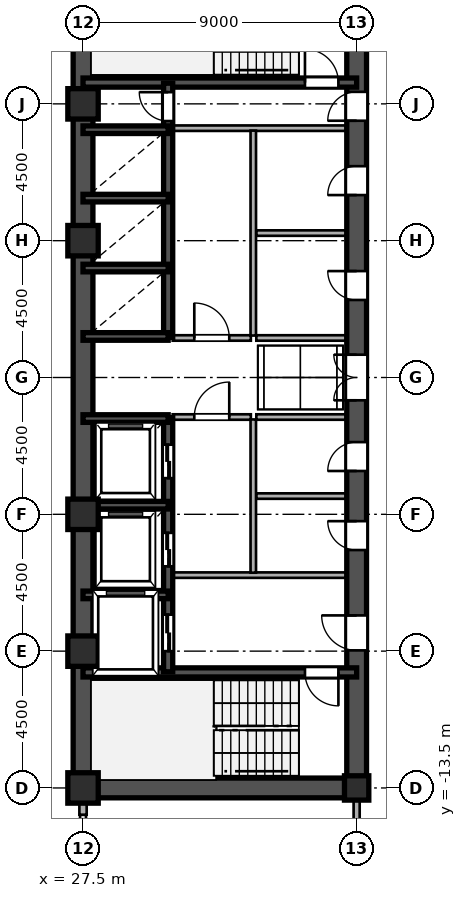
"""IFC4 building model, lengths in metres.
Left out: names, types, materials, properties, quantities, classifications, styles, units other than length and angle.
Written with IfcOpenShell. Run it as: python <this file> out.ifc"""

import sys

from ifc_helpers import new_model, si_unit, direction, frame, frame_2d, origin, origin_2d, place, context, subcontext, project, spatial, rectangle, hollow_rectangle, i_section, extrude, source, transform, mapped, element, fill, save


model = new_model("IFC4")
c1 = context("Model", 3, precision=1e-05, world=origin(), true_north=direction((0.0, 1.0)))
c2 = subcontext(c1, "Body", "Model", "MODEL_VIEW")
j1 = project(units=[si_unit("LENGTHUNIT", "METRE"), si_unit("PLANEANGLEUNIT", "RADIAN")], contexts=[c1])
p1 = place(None, origin())
s1 = spatial("IfcSite", under=j1, at=p1, CompositionType="ELEMENT")
p2 = place(p1, origin())
s2 = spatial("IfcBuilding", under=s1, at=p2, CompositionType="ELEMENT")
p3 = place(p2, frame((0.0, 0.0, 69.3)))
s3 = spatial("IfcBuildingStorey", under=s2, at=p3, CompositionType="ELEMENT", Elevation=69.3)
m1 = source(origin(), c2, "Body", "SweptSolid", [
    extrude(hollow_rectangle(XDim=1.0, YDim=1.0, WallThickness=0.042, at=origin_2d()), origin(), (0.0, 0.0, 1.0), 3.6),
])
for number, where, z_axis, x_axis in (
    (1, (27.5, -13.5, 0.0), (0.0, 0.0, 1.0), (1.0, 0.0, 0.0)),
    (2, (27.5, -9.0, 0.0), (0.0, 0.0, 1.0), (1.0, 0.0, 0.0)),
    (3, (27.5, -4.5, 0.0), (0.0, 0.0, 1.0), (1.0, 0.0, 0.0)),
    (4, (27.5, 4.5, 0.0), (0.0, 0.0, 1.0), (1.0, 0.0, 0.0)),
    (5, (27.5, 9.0, 0.0), (0.0, 0.0, 1.0), (1.0, 0.0, 0.0)),
):
    element("IfcColumn", number, at=place(p3, frame(where, z_axis=z_axis, x_axis=x_axis)), inside=s3, PredefinedType="COLUMN", context=c2, shape_type="MappedRepresentation", body=[
        mapped(m1, transform((0.0, 0.0, 0.0), scale=1.0)),
    ])
m2 = source(origin(), c2, "Body", "SweptSolid", [
    extrude(i_section(OverallWidth=0.8, OverallDepth=0.8, WebThickness=0.032, FlangeThickness=0.05, at=origin_2d()), origin(), (0.0, 0.0, 1.0), 3.6),
])
p4 = place(p3, frame((36.5, -13.5, 0.0), z_axis=(0.0, 0.0, 1.0), x_axis=(1.0, 0.0, 0.0)))
e6 = element("IfcColumn", 6, at=p4, inside=s3, PredefinedType="COLUMN", context=c2, shape_type="MappedRepresentation", body=[
    mapped(m2, transform((0.0, 0.0, 0.0), scale=1.0)),
])
p5 = place(p3, frame((27.5, -14.38, 0.0), z_axis=(0.0, 0.0, 1.0), x_axis=(0.0, 1.0, 0.0)))
e7 = element("IfcWall", 7, at=p5, inside=s3, PredefinedType="SOLIDWALL", context=c2, shape_type="SweptSolid", body=[
    extrude(rectangle(XDim=0.55, YDim=0.24, at=frame_2d((0.275, 0.0))), origin(), (0.0, 0.0, 1.0), 2.88),
])
for number, where, z_axis, x_axis in (
    (8, (27.5, -13.5, 0.0), (0.0, 0.0, 1.0), (0.0, 1.0, 0.0)),
    (9, (27.5, 1.3, 0.0), (0.0, 0.0, 1.0), (0.0, 1.0, 0.0)),
):
    element("IfcWall", number, at=place(p3, frame(where, z_axis=z_axis, x_axis=x_axis)), inside=s3, PredefinedType="SHEAR", context=c2, shape_type="SweptSolid", body=[
        extrude(rectangle(XDim=12.2, YDim=0.65, at=frame_2d((6.1, 0.0))), origin(), (0.0, 0.0, 1.0), 3.38),
    ])
p6 = place(p3, frame((27.5, -1.3, 0.0), z_axis=(0.0, 0.0, 1.0), x_axis=(0.0, 1.0, 0.0)))
e10 = element("IfcWall", 10, at=p6, inside=s3, PredefinedType="SHEAR", context=c2, shape_type="SweptSolid", body=[
    extrude(rectangle(XDim=2.6, YDim=0.65, at=frame_2d((1.3, 0.0))), origin(), (0.0, 0.0, 1.0), 3.38),
])
p7 = place(p3, frame((27.5, -13.5, 0.0), z_axis=(0.0, 0.0, 1.0), x_axis=(1.0, 0.0, 0.0)))
e11 = element("IfcWall", 11, at=p7, inside=s3, PredefinedType="SHEAR", context=c2, shape_type="SweptSolid", body=[
    extrude(rectangle(XDim=9.0, YDim=0.65, at=frame_2d((4.5, 0.0))), origin(), (0.0, 0.0, 1.0), 3.38),
])
p8 = place(p3, frame((36.5, -13.65, 0.0), z_axis=(0.0, 0.0, 1.0), x_axis=(0.0, 1.0, 0.0)))
e12 = element("IfcWall", 12, at=p8, inside=s3, PredefinedType="SHEAR", context=c2, shape_type="SweptSolid", body=[
    extrude(rectangle(XDim=7.15, YDim=0.65, at=frame_2d((3.575, 0.0))), origin(), (0.0, 0.0, 1.0), 3.38),
])
p9 = place(p8, frame((4.675, 0.0, 0.0)))
e13 = element("IfcOpeningElement", 13, at=p9, cuts=e12, PredefinedType="OPENING", context=c2, shape_type="SweptSolid", body=[
    extrude(rectangle(XDim=1.15, YDim=2.2, at=frame_2d((0.575, 1.1))), frame((0.0, 0.335, 0.0), z_axis=(0.0, -1.0, 0.0), x_axis=(1.0, 0.0, 0.0)), (0.0, 0.0, 1.0), 0.67),
])
p10 = place(p3, frame((36.5, -1.3, 0.0), z_axis=(0.0, 0.0, 1.0), x_axis=(0.0, 1.0, 0.0)))
e14 = element("IfcWall", 14, at=p10, inside=s3, PredefinedType="SHEAR", context=c2, shape_type="SweptSolid", body=[
    extrude(rectangle(XDim=2.6, YDim=0.65, at=frame_2d((1.3, 0.0))), origin(), (0.0, 0.0, 1.0), 3.38),
])
p11 = place(p10, frame((0.55, 0.0, 0.0)))
e15 = element("IfcOpeningElement", 15, at=p11, cuts=e14, PredefinedType="OPENING", context=c2, shape_type="SweptSolid", body=[
    extrude(rectangle(XDim=1.5, YDim=2.3, at=frame_2d((0.75, 1.15))), frame((0.0, 0.335, 0.0), z_axis=(0.0, -1.0, 0.0), x_axis=(1.0, 0.0, 0.0)), (0.0, 0.0, 1.0), 0.67),
])
p12 = place(p3, frame((36.5, 8.2, 0.0), z_axis=(0.0, 0.0, 1.0), x_axis=(0.0, 1.0, 0.0)))
e16 = element("IfcWall", 16, at=p12, inside=s3, PredefinedType="SHEAR", context=c2, shape_type="SweptSolid", body=[
    extrude(rectangle(XDim=5.45, YDim=0.65, at=frame_2d((2.725, 0.0))), origin(), (0.0, 0.0, 1.0), 3.38),
])
p13 = place(p12, frame((0.245, 0.0, 0.0)))
e17 = element("IfcOpeningElement", 17, at=p13, cuts=e16, PredefinedType="OPENING", context=c2, shape_type="SweptSolid", body=[
    extrude(rectangle(XDim=0.95, YDim=2.15, at=frame_2d((0.475, 1.075))), frame((0.0, 0.335, 0.0), z_axis=(0.0, -1.0, 0.0), x_axis=(1.0, 0.0, 0.0)), (0.0, 0.0, 1.0), 0.67),
])
p14 = place(p3, frame((36.5, -6.5, 0.0), z_axis=(0.0, 0.0, 1.0), x_axis=(0.0, 1.0, 0.0)))
e18 = element("IfcWall", 18, at=p14, inside=s3, PredefinedType="SHEAR", context=c2, shape_type="SweptSolid", body=[
    extrude(rectangle(XDim=2.6, YDim=0.65, at=frame_2d((1.3, 0.0))), origin(), (0.0, 0.0, 1.0), 3.38),
])
p15 = place(p14, frame((0.825, 0.0, 0.0)))
e19 = element("IfcOpeningElement", 19, at=p15, cuts=e18, PredefinedType="OPENING", context=c2, shape_type="SweptSolid", body=[
    extrude(rectangle(XDim=0.95, YDim=2.15, at=frame_2d((0.475, 1.075))), frame((0.0, 0.335, 0.0), z_axis=(0.0, -1.0, 0.0), x_axis=(1.0, 0.0, 0.0)), (0.0, 0.0, 1.0), 0.67),
])
p16 = place(p3, frame((36.5, -3.9, 0.0), z_axis=(0.0, 0.0, 1.0), x_axis=(0.0, 1.0, 0.0)))
e20 = element("IfcWall", 20, at=p16, inside=s3, PredefinedType="SHEAR", context=c2, shape_type="SweptSolid", body=[
    extrude(rectangle(XDim=2.6, YDim=0.65, at=frame_2d((1.3, 0.0))), origin(), (0.0, 0.0, 1.0), 3.38),
])
p17 = place(p16, frame((0.825, 0.0, 0.0)))
e21 = element("IfcOpeningElement", 21, at=p17, cuts=e20, PredefinedType="OPENING", context=c2, shape_type="SweptSolid", body=[
    extrude(rectangle(XDim=0.95, YDim=2.15, at=frame_2d((0.475, 1.075))), frame((0.0, 0.335, 0.0), z_axis=(0.0, -1.0, 0.0), x_axis=(1.0, 0.0, 0.0)), (0.0, 0.0, 1.0), 0.67),
])
p18 = place(p3, frame((36.5, 1.3, 0.0), z_axis=(0.0, 0.0, 1.0), x_axis=(0.0, 1.0, 0.0)))
e22 = element("IfcWall", 22, at=p18, inside=s3, PredefinedType="SHEAR", context=c2, shape_type="SweptSolid", body=[
    extrude(rectangle(XDim=3.45, YDim=0.65, at=frame_2d((1.725, 0.0))), origin(), (0.0, 0.0, 1.0), 3.38),
])
p19 = place(p18, frame((1.25, 0.0, 0.0)))
e23 = element("IfcOpeningElement", 23, at=p19, cuts=e22, PredefinedType="OPENING", context=c2, shape_type="SweptSolid", body=[
    extrude(rectangle(XDim=0.95, YDim=2.15, at=frame_2d((0.475, 1.075))), frame((0.0, 0.335, 0.0), z_axis=(0.0, -1.0, 0.0), x_axis=(1.0, 0.0, 0.0)), (0.0, 0.0, 1.0), 0.67),
])
p20 = place(p3, frame((36.5, 4.75, 0.0), z_axis=(0.0, 0.0, 1.0), x_axis=(0.0, 1.0, 0.0)))
e24 = element("IfcWall", 24, at=p20, inside=s3, PredefinedType="SHEAR", context=c2, shape_type="SweptSolid", body=[
    extrude(rectangle(XDim=3.45, YDim=0.65, at=frame_2d((1.725, 0.0))), origin(), (0.0, 0.0, 1.0), 3.38),
])
p21 = place(p20, frame((1.25, 0.0, 0.0)))
e25 = element("IfcOpeningElement", 25, at=p21, cuts=e24, PredefinedType="OPENING", context=c2, shape_type="SweptSolid", body=[
    extrude(rectangle(XDim=0.95, YDim=2.15, at=frame_2d((0.475, 1.075))), frame((0.0, 0.335, 0.0), z_axis=(0.0, -1.0, 0.0), x_axis=(1.0, 0.0, 0.0)), (0.0, 0.0, 1.0), 0.67),
])
p22 = place(p3, frame((27.5, -9.7, 0.0), z_axis=(0.0, 0.0, 1.0), x_axis=(1.0, 0.0, 0.0)))
e26 = element("IfcWall", 26, at=p22, inside=s3, PredefinedType="SHEAR", context=c2, shape_type="SweptSolid", body=[
    extrude(rectangle(XDim=9.0, YDim=0.3, at=frame_2d((4.5, 0.0))), origin(), (0.0, 0.0, 1.0), 3.38),
])
p23 = place(p22, frame((7.3, 0.0, 0.0)))
e27 = element("IfcOpeningElement", 27, at=p23, cuts=e26, PredefinedType="OPENING", context=c2, shape_type="SweptSolid", body=[
    extrude(rectangle(XDim=1.1, YDim=2.2, at=frame_2d((0.55, 1.1))), frame((0.0, 0.16, 0.0), z_axis=(0.0, -1.0, 0.0), x_axis=(1.0, 0.0, 0.0)), (0.0, 0.0, 1.0), 0.32),
])
p24 = place(p3, frame((27.5, 9.7, 0.0), z_axis=(0.0, 0.0, 1.0), x_axis=(1.0, 0.0, 0.0)))
e28 = element("IfcWall", 28, at=p24, inside=s3, PredefinedType="SHEAR", context=c2, shape_type="SweptSolid", body=[
    extrude(rectangle(XDim=9.0, YDim=0.3, at=frame_2d((4.5, 0.0))), origin(), (0.0, 0.0, 1.0), 3.38),
])
p25 = place(p24, frame((7.3, 0.0, 0.0)))
e29 = element("IfcOpeningElement", 29, at=p25, cuts=e28, PredefinedType="OPENING", context=c2, shape_type="SweptSolid", body=[
    extrude(rectangle(XDim=1.1, YDim=2.2, at=frame_2d((0.55, 1.1))), frame((0.0, 0.16, 0.0), z_axis=(0.0, -1.0, 0.0), x_axis=(1.0, 0.0, 0.0)), (0.0, 0.0, 1.0), 0.32),
])
for number, where, z_axis, x_axis in (
    (30, (27.5, -7.15, 0.0), (0.0, 0.0, 1.0), (1.0, 0.0, 0.0)),
    (31, (27.5, -4.2, 0.0), (0.0, 0.0, 1.0), (1.0, 0.0, 0.0)),
    (32, (27.5, -1.35, 0.0), (0.0, 0.0, 1.0), (1.0, 0.0, 0.0)),
    (33, (27.5, 1.35, 0.0), (0.0, 0.0, 1.0), (1.0, 0.0, 0.0)),
    (34, (27.5, 3.6, 0.0), (0.0, 0.0, 1.0), (1.0, 0.0, 0.0)),
    (35, (27.5, 5.9, 0.0), (0.0, 0.0, 1.0), (1.0, 0.0, 0.0)),
    (36, (27.5, 8.15, 0.0), (0.0, 0.0, 1.0), (1.0, 0.0, 0.0)),
):
    element("IfcWall", number, at=place(p3, frame(where, z_axis=z_axis, x_axis=x_axis)), inside=s3, PredefinedType="SHEAR", context=c2, shape_type="SweptSolid", body=[
        extrude(rectangle(XDim=2.8, YDim=0.25, at=frame_2d((1.4, 0.0))), origin(), (0.0, 0.0, 1.0), 3.38),
    ])
p26 = place(p3, frame((30.3, -9.68, 0.0), z_axis=(0.0, 0.0, 1.0), x_axis=(0.0, 1.0, 0.0)))
e37 = element("IfcWall", 37, at=p26, inside=s3, PredefinedType="SHEAR", context=c2, shape_type="SweptSolid", body=[
    extrude(rectangle(XDim=2.56, YDim=0.3, at=frame_2d((1.28, 0.0))), origin(), (0.0, 0.0, 1.0), 3.38),
])
p27 = place(p26, frame((0.68, 0.0, 0.0)))
e38 = element("IfcOpeningElement", 38, at=p27, cuts=e37, PredefinedType="OPENING", context=c2, shape_type="SweptSolid", body=[
    extrude(rectangle(XDim=1.2, YDim=2.25, at=frame_2d((0.6, 1.125))), frame((0.0, 0.16, 0.0), z_axis=(0.0, -1.0, 0.0), x_axis=(1.0, 0.0, 0.0)), (0.0, 0.0, 1.0), 0.32),
])
p28 = place(p3, frame((30.3, -7.12, 0.0), z_axis=(0.0, 0.0, 1.0), x_axis=(0.0, 1.0, 0.0)))
e39 = element("IfcWall", 39, at=p28, inside=s3, PredefinedType="SHEAR", context=c2, shape_type="SweptSolid", body=[
    extrude(rectangle(XDim=2.92, YDim=0.3, at=frame_2d((1.46, 0.0))), origin(), (0.0, 0.0, 1.0), 3.38),
])
p29 = place(p28, frame((0.91, 0.0, 0.0)))
e40 = element("IfcOpeningElement", 40, at=p29, cuts=e39, PredefinedType="OPENING", context=c2, shape_type="SweptSolid", body=[
    extrude(rectangle(XDim=1.1, YDim=2.2, at=frame_2d((0.55, 1.1))), frame((0.0, 0.16, 0.0), z_axis=(0.0, -1.0, 0.0), x_axis=(1.0, 0.0, 0.0)), (0.0, 0.0, 1.0), 0.32),
])
p30 = place(p3, frame((30.3, -4.2, 0.0), z_axis=(0.0, 0.0, 1.0), x_axis=(0.0, 1.0, 0.0)))
e41 = element("IfcWall", 41, at=p30, inside=s3, PredefinedType="SHEAR", context=c2, shape_type="SweptSolid", body=[
    extrude(rectangle(XDim=2.88, YDim=0.3, at=frame_2d((1.44, 0.0))), origin(), (0.0, 0.0, 1.0), 3.38),
])
p31 = place(p30, frame((0.89, 0.0, 0.0)))
e42 = element("IfcOpeningElement", 42, at=p31, cuts=e41, PredefinedType="OPENING", context=c2, shape_type="SweptSolid", body=[
    extrude(rectangle(XDim=1.1, YDim=2.2, at=frame_2d((0.55, 1.1))), frame((0.0, 0.16, 0.0), z_axis=(0.0, -1.0, 0.0), x_axis=(1.0, 0.0, 0.0)), (0.0, 0.0, 1.0), 0.32),
])
p32 = place(p3, frame((30.3, 1.32, 0.0), z_axis=(0.0, 0.0, 1.0), x_axis=(0.0, 1.0, 0.0)))
e43 = element("IfcWall", 43, at=p32, inside=s3, PredefinedType="SHEAR", context=c2, shape_type="SweptSolid", body=[
    extrude(rectangle(XDim=2.28, YDim=0.3, at=frame_2d((1.14, 0.0))), origin(), (0.0, 0.0, 1.0), 3.38),
])
p33 = place(p3, frame((30.3, 3.6, 0.0), z_axis=(0.0, 0.0, 1.0), x_axis=(0.0, 1.0, 0.0)))
e44 = element("IfcWall", 44, at=p33, inside=s3, PredefinedType="SHEAR", context=c2, shape_type="SweptSolid", body=[
    extrude(rectangle(XDim=2.3, YDim=0.3, at=frame_2d((1.15, 0.0))), origin(), (0.0, 0.0, 1.0), 3.38),
])
p34 = place(p3, frame((30.3, 5.9, 0.0), z_axis=(0.0, 0.0, 1.0), x_axis=(0.0, 1.0, 0.0)))
e45 = element("IfcWall", 45, at=p34, inside=s3, PredefinedType="SHEAR", context=c2, shape_type="SweptSolid", body=[
    extrude(rectangle(XDim=2.25, YDim=0.3, at=frame_2d((1.125, 0.0))), origin(), (0.0, 0.0, 1.0), 3.38),
])
p35 = place(p3, frame((30.3, 8.15, 0.0), z_axis=(0.0, 0.0, 1.0), x_axis=(0.0, 1.0, 0.0)))
e46 = element("IfcWall", 46, at=p35, inside=s3, PredefinedType="SHEAR", context=c2, shape_type="SweptSolid", body=[
    extrude(rectangle(XDim=1.53, YDim=0.3, at=frame_2d((0.765, 0.0))), origin(), (0.0, 0.0, 1.0), 3.38),
])
p36 = place(p35, frame((0.285, 0.0, 0.0)))
e47 = element("IfcOpeningElement", 47, at=p36, cuts=e46, PredefinedType="OPENING", context=c2, shape_type="SweptSolid", body=[
    extrude(rectangle(XDim=0.95, YDim=2.15, at=frame_2d((0.475, 1.075))), frame((0.0, 0.16, 0.0), z_axis=(0.0, -1.0, 0.0), x_axis=(1.0, 0.0, 0.0)), (0.0, 0.0, 1.0), 0.32),
])
for number, where, z_axis, x_axis in (
    (48, (30.45, -6.5, 0.0), (0.0, 0.0, 1.0), (1.0, 0.0, 0.0)),
    (49, (30.45, 8.2, 0.0), (0.0, 0.0, 1.0), (1.0, 0.0, 0.0)),
):
    element("IfcWall", number, at=place(p3, frame(where, z_axis=z_axis, x_axis=x_axis)), inside=s3, PredefinedType="PARTITIONING", context=c2, shape_type="SweptSolid", body=[
        extrude(rectangle(XDim=5.7, YDim=0.18, at=frame_2d((2.85, 0.0))), origin(), (0.0, 0.0, 1.0), 3.38),
    ])
p37 = place(p3, frame((33.1, -6.42, 0.0), z_axis=(0.0, 0.0, 1.0), x_axis=(0.0, 1.0, 0.0)))
e50 = element("IfcWall", 50, at=p37, inside=s3, PredefinedType="PARTITIONING", context=c2, shape_type="SweptSolid", body=[
    extrude(rectangle(XDim=5.04, YDim=0.18, at=frame_2d((2.52, 0.0))), origin(), (0.0, 0.0, 1.0), 3.38),
])
p38 = place(p3, frame((33.1, 1.38, 0.0), z_axis=(0.0, 0.0, 1.0), x_axis=(0.0, 1.0, 0.0)))
e51 = element("IfcWall", 51, at=p38, inside=s3, PredefinedType="PARTITIONING", context=c2, shape_type="SweptSolid", body=[
    extrude(rectangle(XDim=6.74, YDim=0.18, at=frame_2d((3.37, 0.0))), origin(), (0.0, 0.0, 1.0), 3.38),
])
p39 = place(p3, frame((30.45, -1.3, 0.0), z_axis=(0.0, 0.0, 1.0), x_axis=(1.0, 0.0, 0.0)))
e52 = element("IfcWall", 52, at=p39, inside=s3, PredefinedType="PARTITIONING", context=c2, shape_type="SweptSolid", body=[
    extrude(rectangle(XDim=2.57, YDim=0.18, at=frame_2d((1.285, 0.0))), origin(), (0.0, 0.0, 1.0), 3.38),
])
p40 = place(p39, frame((0.71, 0.0, 0.0)))
e53 = element("IfcOpeningElement", 53, at=p40, cuts=e52, PredefinedType="OPENING", context=c2, shape_type="SweptSolid", body=[
    extrude(rectangle(XDim=1.15, YDim=2.2, at=frame_2d((0.575, 1.1))), frame((0.0, 0.1, 0.0), z_axis=(0.0, -1.0, 0.0), x_axis=(1.0, 0.0, 0.0)), (0.0, 0.0, 1.0), 0.2),
])
p41 = place(p3, frame((30.45, 1.3, 0.0), z_axis=(0.0, 0.0, 1.0), x_axis=(1.0, 0.0, 0.0)))
e54 = element("IfcWall", 54, at=p41, inside=s3, PredefinedType="PARTITIONING", context=c2, shape_type="SweptSolid", body=[
    extrude(rectangle(XDim=2.57, YDim=0.18, at=frame_2d((1.285, 0.0))), origin(), (0.0, 0.0, 1.0), 3.38),
])
p42 = place(p41, frame((0.71, 0.0, 0.0)))
e55 = element("IfcOpeningElement", 55, at=p42, cuts=e54, PredefinedType="OPENING", context=c2, shape_type="SweptSolid", body=[
    extrude(rectangle(XDim=1.15, YDim=2.2, at=frame_2d((0.575, 1.1))), frame((0.0, 0.1, 0.0), z_axis=(0.0, -1.0, 0.0), x_axis=(1.0, 0.0, 0.0)), (0.0, 0.0, 1.0), 0.2),
])
for number, where, z_axis, x_axis in (
    (56, (33.2, -1.3, 0.0), (0.0, 0.0, 1.0), (1.0, 0.0, 0.0)),
    (57, (33.2, 1.3, 0.0), (0.0, 0.0, 1.0), (1.0, 0.0, 0.0)),
    (58, (33.2, -3.9, 0.0), (0.0, 0.0, 1.0), (1.0, 0.0, 0.0)),
    (59, (33.2, 4.75, 0.0), (0.0, 0.0, 1.0), (1.0, 0.0, 0.0)),
):
    element("IfcWall", number, at=place(p3, frame(where, z_axis=z_axis, x_axis=x_axis)), inside=s3, PredefinedType="PARTITIONING", context=c2, shape_type="SweptSolid", body=[
        extrude(rectangle(XDim=2.95, YDim=0.18, at=frame_2d((1.475, 0.0))), origin(), (0.0, 0.0, 1.0), 3.38),
    ])
p43 = place(p3, frame((36.5, -15.515, 0.0), z_axis=(0.0, 0.0, 1.0), x_axis=(0.0, 1.0, 0.0)))
e60 = element("IfcWall", 60, at=p43, inside=s3, PredefinedType="PARTITIONING", context=c2, shape_type="SweptSolid", body=[
    extrude(rectangle(XDim=1.685, YDim=0.2, at=frame_2d((0.842, 0.0))), origin(), (0.0, 0.0, 1.0), 2.68),
])
m3 = source(origin(), c2, "Body", "SweptSolid", [
    extrude(rectangle(XDim=1.15, YDim=2.2, at=frame_2d((0.575, 1.1))), frame((0.0, 0.025, 0.0), z_axis=(0.0, -1.0, 0.0), x_axis=(1.0, 0.0, 0.0)), (0.0, 0.0, 1.0), 0.05),
])
p44 = place(p9, origin())
e61 = element("IfcDoor", 61, at=p44, inside=s3, OperationType="SINGLE_SWING_RIGHT", PredefinedType="DOOR", context=c2, shape_type="MappedRepresentation", body=[
    mapped(m3, transform((0.0, 0.0, 0.0), scale=1.0)),
])
fill(e13, e61)
m4 = source(origin(), c2, "Body", "SweptSolid", [
    extrude(rectangle(XDim=1.5, YDim=2.3, at=frame_2d((0.75, 1.15))), frame((0.0, 0.025, 0.0), z_axis=(0.0, -1.0, 0.0), x_axis=(1.0, 0.0, 0.0)), (0.0, 0.0, 1.0), 0.05),
])
p45 = place(p11, origin())
e62 = element("IfcDoor", 62, at=p45, inside=s3, OperationType="DOUBLE_SWING_LEFT", PredefinedType="DOOR", context=c2, shape_type="MappedRepresentation", body=[
    mapped(m4, transform((0.0, 0.0, 0.0), scale=1.0)),
])
fill(e15, e62)
m5 = source(origin(), c2, "Body", "SweptSolid", [
    extrude(rectangle(XDim=0.95, YDim=2.15, at=frame_2d((0.475, 1.075))), frame((0.0, 0.025, 0.0), z_axis=(0.0, -1.0, 0.0), x_axis=(1.0, 0.0, 0.0)), (0.0, 0.0, 1.0), 0.05),
])
p46 = place(p13, origin())
e63 = element("IfcDoor", 63, at=p46, inside=s3, OperationType="SINGLE_SWING_LEFT", PredefinedType="DOOR", context=c2, shape_type="MappedRepresentation", body=[
    mapped(m5, transform((0.0, 0.0, 0.0), scale=1.0)),
])
fill(e17, e63)
p47 = place(p15, origin())
e64 = element("IfcDoor", 64, at=p47, inside=s3, OperationType="SINGLE_SWING_RIGHT", PredefinedType="DOOR", context=c2, shape_type="MappedRepresentation", body=[
    mapped(m5, transform((0.0, 0.0, 0.0), scale=1.0)),
])
fill(e19, e64)
p48 = place(p17, origin())
e65 = element("IfcDoor", 65, at=p48, inside=s3, OperationType="SINGLE_SWING_LEFT", PredefinedType="DOOR", context=c2, shape_type="MappedRepresentation", body=[
    mapped(m5, transform((0.0, 0.0, 0.0), scale=1.0)),
])
fill(e21, e65)
p49 = place(p19, origin())
e66 = element("IfcDoor", 66, at=p49, inside=s3, OperationType="SINGLE_SWING_RIGHT", PredefinedType="DOOR", context=c2, shape_type="MappedRepresentation", body=[
    mapped(m5, transform((0.0, 0.0, 0.0), scale=1.0)),
])
fill(e23, e66)
p50 = place(p21, origin())
e67 = element("IfcDoor", 67, at=p50, inside=s3, OperationType="SINGLE_SWING_LEFT", PredefinedType="DOOR", context=c2, shape_type="MappedRepresentation", body=[
    mapped(m5, transform((0.0, 0.0, 0.0), scale=1.0)),
])
fill(e25, e67)
m6 = source(origin(), c2, "Body", "SweptSolid", [
    extrude(rectangle(XDim=1.1, YDim=2.2, at=frame_2d((0.55, 1.1))), frame((0.0, 0.025, 0.0), z_axis=(0.0, -1.0, 0.0), x_axis=(1.0, 0.0, 0.0)), (0.0, 0.0, 1.0), 0.05),
])
p51 = place(p23, frame((1.1, 0.0, 0.0), z_axis=(0.0, 0.0, 1.0), x_axis=(-1.0, 0.0, 0.0)))
e68 = element("IfcDoor", 68, at=p51, inside=s3, OperationType="SINGLE_SWING_RIGHT", PredefinedType="DOOR", context=c2, shape_type="MappedRepresentation", body=[
    mapped(m6, transform((0.0, 0.0, 0.0), scale=1.0)),
])
fill(e27, e68)
p52 = place(p25, origin())
e69 = element("IfcDoor", 69, at=p52, inside=s3, OperationType="SINGLE_SWING_LEFT", PredefinedType="DOOR", context=c2, shape_type="MappedRepresentation", body=[
    mapped(m6, transform((0.0, 0.0, 0.0), scale=1.0)),
])
fill(e29, e69)
m7 = source(origin(), c2, "Body", "SweptSolid", [
    extrude(rectangle(XDim=1.2, YDim=2.25, at=frame_2d((0.6, 1.125))), frame((0.0, 0.025, 0.0), z_axis=(0.0, -1.0, 0.0), x_axis=(1.0, 0.0, 0.0)), (0.0, 0.0, 1.0), 0.05),
])
p53 = place(p27, origin())
e70 = element("IfcDoor", 70, at=p53, inside=s3, OperationType="DOUBLE_DOOR_SLIDING", PredefinedType="DOOR", context=c2, shape_type="MappedRepresentation", body=[
    mapped(m7, transform((0.0, 0.0, 0.0), scale=1.0)),
])
fill(e38, e70)
m8 = source(origin(), c2, "Body", "SweptSolid", [
    extrude(rectangle(XDim=1.1, YDim=2.2, at=frame_2d((0.55, 1.1))), frame((0.0, 0.025, 0.0), z_axis=(0.0, -1.0, 0.0), x_axis=(1.0, 0.0, 0.0)), (0.0, 0.0, 1.0), 0.05),
])
p54 = place(p29, origin())
e71 = element("IfcDoor", 71, at=p54, inside=s3, OperationType="DOUBLE_DOOR_SLIDING", PredefinedType="DOOR", context=c2, shape_type="MappedRepresentation", body=[
    mapped(m8, transform((0.0, 0.0, 0.0), scale=1.0)),
])
fill(e40, e71)
p55 = place(p31, origin())
e72 = element("IfcDoor", 72, at=p55, inside=s3, OperationType="DOUBLE_DOOR_SLIDING", PredefinedType="DOOR", context=c2, shape_type="MappedRepresentation", body=[
    mapped(m8, transform((0.0, 0.0, 0.0), scale=1.0)),
])
fill(e42, e72)
p56 = place(p36, origin())
e73 = element("IfcDoor", 73, at=p56, inside=s3, OperationType="SINGLE_SWING_RIGHT", PredefinedType="DOOR", context=c2, shape_type="MappedRepresentation", body=[
    mapped(m5, transform((0.0, 0.0, 0.0), scale=1.0)),
])
fill(e47, e73)
p57 = place(p40, origin())
e74 = element("IfcDoor", 74, at=p57, inside=s3, OperationType="SINGLE_SWING_RIGHT", PredefinedType="DOOR", context=c2, shape_type="MappedRepresentation", body=[
    mapped(m3, transform((0.0, 0.0, 0.0), scale=1.0)),
])
fill(e53, e74)
p58 = place(p42, origin())
e75 = element("IfcDoor", 75, at=p58, inside=s3, OperationType="SINGLE_SWING_LEFT", PredefinedType="DOOR", context=c2, shape_type="MappedRepresentation", body=[
    mapped(m3, transform((0.0, 0.0, 0.0), scale=1.0)),
])
fill(e55, e75)
save(model, sys.argv[1])
